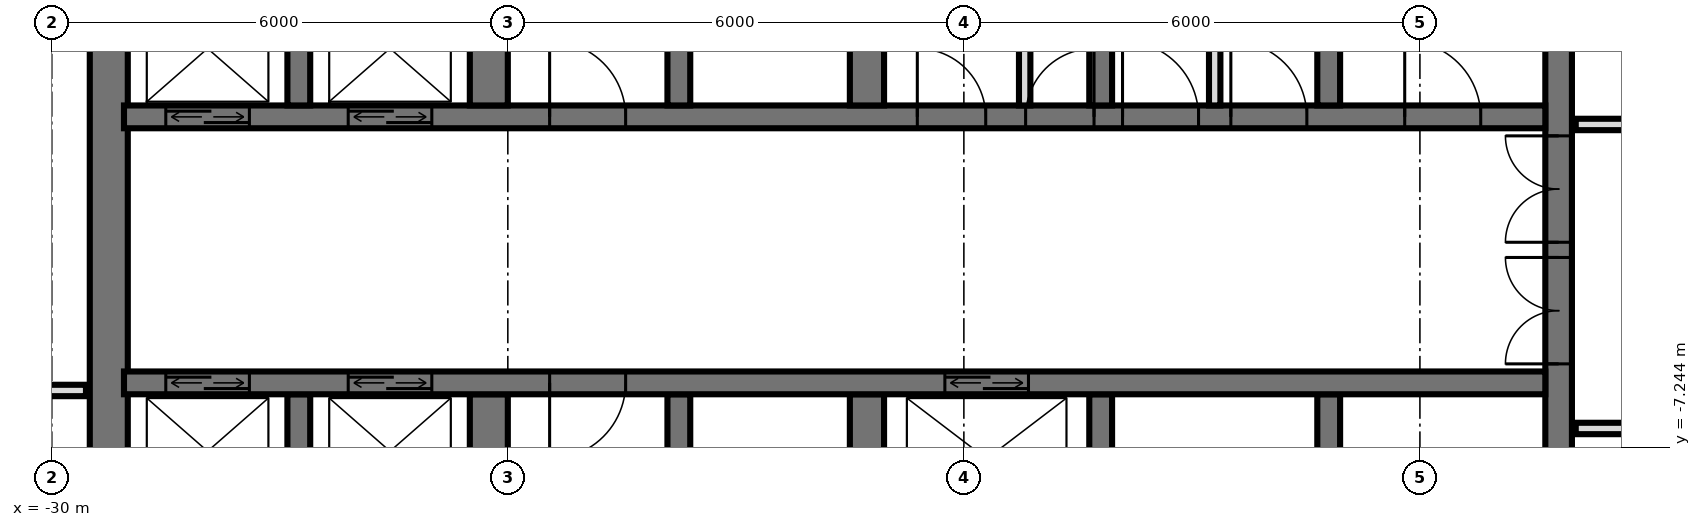
"""IFC4 building model, lengths in metres.
Left out: names, types, materials, properties, quantities, classifications, styles, units other than length and angle.
Written with IfcOpenShell. Run it as: python <this file> out.ifc"""

import sys

from ifc_helpers import new_model, si_unit, direction, frame, frame_2d, origin, place, context, subcontext, project, spatial, rectangle, extrude, element, fill, save


model = new_model("IFC4")
c1 = context("Model", 3, precision=1e-05, world=origin(), true_north=direction((0.0, 1.0)))
c2 = subcontext(c1, "Body", "Model", "MODEL_VIEW")
j1 = project(units=[si_unit("LENGTHUNIT", "METRE"), si_unit("PLANEANGLEUNIT", "RADIAN")], contexts=[c1])
p1 = place(None, origin())
s1 = spatial("IfcSite", under=j1, at=p1, CompositionType="ELEMENT")
p2 = place(p1, origin())
s2 = spatial("IfcBuilding", under=s1, at=p2, CompositionType="ELEMENT")
p3 = place(p2, frame((0.0, 0.0, 74.4)))
s3 = spatial("IfcBuildingStorey", under=s2, at=p3, CompositionType="ELEMENT", Elevation=74.4)
p4 = place(p3, frame((-10.175, -14.55, 0.0), z_axis=(0.0, 0.0, 1.0), x_axis=(0.0, 1.0, 0.0)))
e1 = element("IfcWall", 1, at=p4, inside=s3, PredefinedType="SHEAR", context=c2, shape_type="SweptSolid", body=[
    extrude(rectangle(XDim=14.1, YDim=0.35, at=frame_2d((7.05, 0.0))), origin(), (0.0, 0.0, 1.0), 3.6),
])
p5 = place(p4, frame((8.4, 0.0, 0.0)))
e2 = element("IfcOpeningElement", 2, at=p5, cuts=e1, PredefinedType="OPENING", context=c2, shape_type="SweptSolid", body=[
    extrude(rectangle(XDim=1.4, YDim=2.4, at=frame_2d((0.7, 1.2))), frame((0.0, 0.185, 0.0), z_axis=(0.0, -1.0, 0.0), x_axis=(1.0, 0.0, 0.0)), (0.0, 0.0, 1.0), 0.37),
])
p6 = place(p4, frame((10.0, 0.0, 0.0)))
e3 = element("IfcOpeningElement", 3, at=p6, cuts=e1, PredefinedType="OPENING", context=c2, shape_type="SweptSolid", body=[
    extrude(rectangle(XDim=1.4, YDim=2.4, at=frame_2d((0.7, 1.2))), frame((0.0, 0.185, 0.0), z_axis=(0.0, -1.0, 0.0), x_axis=(1.0, 0.0, 0.0)), (0.0, 0.0, 1.0), 0.37),
])
p7 = place(p4, frame((4.0, 0.0, 0.0)))
e4 = element("IfcOpeningElement", 4, at=p7, cuts=e1, PredefinedType="OPENING", context=c2, shape_type="SweptSolid", body=[
    extrude(rectangle(XDim=1.2, YDim=2.1, at=frame_2d((0.6, 1.05))), frame((0.0, 0.185, 0.0), z_axis=(0.0, -1.0, 0.0), x_axis=(1.0, 0.0, 0.0)), (0.0, 0.0, 1.0), 0.37),
])
p8 = place(p3, frame((-29.25, -14.55, 0.0), z_axis=(0.0, 0.0, 1.0), x_axis=(0.0, 1.0, 0.0)))
e5 = element("IfcWall", 5, at=p8, inside=s3, PredefinedType="SHEAR", context=c2, shape_type="SweptSolid", body=[
    extrude(rectangle(XDim=14.1, YDim=0.5, at=frame_2d((7.05, 0.0))), origin(), (0.0, 0.0, 1.0), 3.6),
])
p9 = place(p3, frame((-29.05, -2.9, 0.0), z_axis=(0.0, 0.0, 1.0), x_axis=(1.0, 0.0, 0.0)))
e6 = element("IfcWall", 6, at=p9, inside=s3, PredefinedType="SHEAR", context=c2, shape_type="SweptSolid", body=[
    extrude(rectangle(XDim=18.7, YDim=0.3, at=frame_2d((9.35, 0.0))), origin(), (0.0, 0.0, 1.0), 3.6),
])
p10 = place(p9, frame((2.95, 0.0, 0.0)))
e7 = element("IfcOpeningElement", 7, at=p10, cuts=e6, PredefinedType="OPENING", context=c2, shape_type="SweptSolid", body=[
    extrude(rectangle(XDim=1.1, YDim=2.1, at=frame_2d((0.55, 1.05))), frame((0.0, 0.16, 0.0), z_axis=(0.0, -1.0, 0.0), x_axis=(1.0, 0.0, 0.0)), (0.0, 0.0, 1.0), 0.32),
])
p11 = place(p9, frame((0.55, 0.0, 0.0)))
e8 = element("IfcOpeningElement", 8, at=p11, cuts=e6, PredefinedType="OPENING", context=c2, shape_type="SweptSolid", body=[
    extrude(rectangle(XDim=1.1, YDim=2.1, at=frame_2d((0.55, 1.05))), frame((0.0, 0.16, 0.0), z_axis=(0.0, -1.0, 0.0), x_axis=(1.0, 0.0, 0.0)), (0.0, 0.0, 1.0), 0.32),
])
p12 = place(p9, frame((11.863, 0.0, 0.0)))
e9 = element("IfcOpeningElement", 9, at=p12, cuts=e6, PredefinedType="OPENING", context=c2, shape_type="SweptSolid", body=[
    extrude(rectangle(XDim=0.9, YDim=2.1, at=frame_2d((0.45, 1.05))), frame((0.0, 0.16, 0.0), z_axis=(0.0, -1.0, 0.0), x_axis=(1.0, 0.0, 0.0)), (0.0, 0.0, 1.0), 0.32),
])
p13 = place(p9, frame((10.438, 0.0, 0.0)))
e10 = element("IfcOpeningElement", 10, at=p13, cuts=e6, PredefinedType="OPENING", context=c2, shape_type="SweptSolid", body=[
    extrude(rectangle(XDim=0.9, YDim=2.1, at=frame_2d((0.45, 1.05))), frame((0.0, 0.16, 0.0), z_axis=(0.0, -1.0, 0.0), x_axis=(1.0, 0.0, 0.0)), (0.0, 0.0, 1.0), 0.32),
])
p14 = place(p9, frame((16.85, 0.0, 0.0)))
e11 = element("IfcOpeningElement", 11, at=p14, cuts=e6, PredefinedType="OPENING", context=c2, shape_type="SweptSolid", body=[
    extrude(rectangle(XDim=1.0, YDim=2.1, at=frame_2d((0.5, 1.05))), frame((0.0, 0.16, 0.0), z_axis=(0.0, -1.0, 0.0), x_axis=(1.0, 0.0, 0.0)), (0.0, 0.0, 1.0), 0.32),
])
p15 = place(p9, frame((14.562, 0.0, 0.0)))
e12 = element("IfcOpeningElement", 12, at=p15, cuts=e6, PredefinedType="OPENING", context=c2, shape_type="SweptSolid", body=[
    extrude(rectangle(XDim=1.0, YDim=2.1, at=frame_2d((0.5, 1.05))), frame((0.0, 0.16, 0.0), z_axis=(0.0, -1.0, 0.0), x_axis=(1.0, 0.0, 0.0)), (0.0, 0.0, 1.0), 0.32),
])
p16 = place(p9, frame((13.137, 0.0, 0.0)))
e13 = element("IfcOpeningElement", 13, at=p16, cuts=e6, PredefinedType="OPENING", context=c2, shape_type="SweptSolid", body=[
    extrude(rectangle(XDim=1.0, YDim=2.1, at=frame_2d((0.5, 1.05))), frame((0.0, 0.16, 0.0), z_axis=(0.0, -1.0, 0.0), x_axis=(1.0, 0.0, 0.0)), (0.0, 0.0, 1.0), 0.32),
])
p17 = place(p9, frame((5.6, 0.0, 0.0)))
e14 = element("IfcOpeningElement", 14, at=p17, cuts=e6, PredefinedType="OPENING", context=c2, shape_type="SweptSolid", body=[
    extrude(rectangle(XDim=1.0, YDim=2.1, at=frame_2d((0.5, 1.05))), frame((0.0, 0.16, 0.0), z_axis=(0.0, -1.0, 0.0), x_axis=(1.0, 0.0, 0.0)), (0.0, 0.0, 1.0), 0.32),
])
p18 = place(p3, frame((-29.05, -6.4, 0.0), z_axis=(0.0, 0.0, 1.0), x_axis=(1.0, 0.0, 0.0)))
e15 = element("IfcWall", 15, at=p18, inside=s3, PredefinedType="SHEAR", context=c2, shape_type="SweptSolid", body=[
    extrude(rectangle(XDim=18.7, YDim=0.3, at=frame_2d((9.35, 0.0))), origin(), (0.0, 0.0, 1.0), 3.6),
])
p19 = place(p18, frame((2.95, 0.0, 0.0)))
e16 = element("IfcOpeningElement", 16, at=p19, cuts=e15, PredefinedType="OPENING", context=c2, shape_type="SweptSolid", body=[
    extrude(rectangle(XDim=1.1, YDim=2.1, at=frame_2d((0.55, 1.05))), frame((0.0, 0.16, 0.0), z_axis=(0.0, -1.0, 0.0), x_axis=(1.0, 0.0, 0.0)), (0.0, 0.0, 1.0), 0.32),
])
p20 = place(p18, frame((0.55, 0.0, 0.0)))
e17 = element("IfcOpeningElement", 17, at=p20, cuts=e15, PredefinedType="OPENING", context=c2, shape_type="SweptSolid", body=[
    extrude(rectangle(XDim=1.1, YDim=2.1, at=frame_2d((0.55, 1.05))), frame((0.0, 0.16, 0.0), z_axis=(0.0, -1.0, 0.0), x_axis=(1.0, 0.0, 0.0)), (0.0, 0.0, 1.0), 0.32),
])
p21 = place(p18, frame((10.8, 0.0, 0.0)))
e18 = element("IfcOpeningElement", 18, at=p21, cuts=e15, PredefinedType="OPENING", context=c2, shape_type="SweptSolid", body=[
    extrude(rectangle(XDim=1.1, YDim=2.1, at=frame_2d((0.55, 1.05))), frame((0.0, 0.16, 0.0), z_axis=(0.0, -1.0, 0.0), x_axis=(1.0, 0.0, 0.0)), (0.0, 0.0, 1.0), 0.32),
])
p22 = place(p18, frame((5.6, 0.0, 0.0)))
e19 = element("IfcOpeningElement", 19, at=p22, cuts=e15, PredefinedType="OPENING", context=c2, shape_type="SweptSolid", body=[
    extrude(rectangle(XDim=1.0, YDim=2.1, at=frame_2d((0.5, 1.05))), frame((0.0, 0.16, 0.0), z_axis=(0.0, -1.0, 0.0), x_axis=(1.0, 0.0, 0.0)), (0.0, 0.0, 1.0), 0.32),
])
for number, where, z_axis, x_axis in (
    (20, (-13.2, -2.75, 0.0), (0.0, 0.0, 1.0), (0.0, 1.0, 0.0)),
    (21, (-13.2, -8.85, 0.0), (0.0, 0.0, 1.0), (0.0, 1.0, 0.0)),
    (22, (-16.2, -2.75, 0.0), (0.0, 0.0, 1.0), (0.0, 1.0, 0.0)),
    (23, (-16.2, -8.85, 0.0), (0.0, 0.0, 1.0), (0.0, 1.0, 0.0)),
):
    element("IfcWall", number, at=place(p3, frame(where, z_axis=z_axis, x_axis=x_axis)), inside=s3, PredefinedType="SHEAR", context=c2, shape_type="SweptSolid", body=[
        extrude(rectangle(XDim=2.3, YDim=0.3, at=frame_2d((1.15, 0.0))), origin(), (0.0, 0.0, 1.0), 3.6),
    ])
for number, where, z_axis, x_axis in (
    (24, (-19.275, -2.75, 0.0), (0.0, 0.0, 1.0), (0.0, 1.0, 0.0)),
    (25, (-19.275, -8.85, 0.0), (0.0, 0.0, 1.0), (0.0, 1.0, 0.0)),
):
    element("IfcWall", number, at=place(p3, frame(where, z_axis=z_axis, x_axis=x_axis)), inside=s3, PredefinedType="SHEAR", context=c2, shape_type="SweptSolid", body=[
        extrude(rectangle(XDim=2.3, YDim=0.45, at=frame_2d((1.15, 0.0))), origin(), (0.0, 0.0, 1.0), 3.6),
    ])
for number, where, z_axis, x_axis in (
    (26, (-21.75, -2.75, 0.0), (0.0, 0.0, 1.0), (0.0, 1.0, 0.0)),
    (27, (-21.75, -8.85, 0.0), (0.0, 0.0, 1.0), (0.0, 1.0, 0.0)),
):
    element("IfcWall", number, at=place(p3, frame(where, z_axis=z_axis, x_axis=x_axis)), inside=s3, PredefinedType="SHEAR", context=c2, shape_type="SweptSolid", body=[
        extrude(rectangle(XDim=2.3, YDim=0.3, at=frame_2d((1.15, 0.0))), origin(), (0.0, 0.0, 1.0), 3.6),
    ])
for number, where, z_axis, x_axis in (
    (28, (-24.25, -2.75, 0.0), (0.0, 0.0, 1.0), (0.0, 1.0, 0.0)),
    (29, (-24.25, -8.85, 0.0), (0.0, 0.0, 1.0), (0.0, 1.0, 0.0)),
):
    element("IfcWall", number, at=place(p3, frame(where, z_axis=z_axis, x_axis=x_axis)), inside=s3, PredefinedType="SHEAR", context=c2, shape_type="SweptSolid", body=[
        extrude(rectangle(XDim=2.3, YDim=0.5, at=frame_2d((1.15, 0.0))), origin(), (0.0, 0.0, 1.0), 3.6),
    ])
for number, where, z_axis, x_axis in (
    (30, (-26.75, -2.75, 0.0), (0.0, 0.0, 1.0), (0.0, 1.0, 0.0)),
    (31, (-26.75, -8.85, 0.0), (0.0, 0.0, 1.0), (0.0, 1.0, 0.0)),
):
    element("IfcWall", number, at=place(p3, frame(where, z_axis=z_axis, x_axis=x_axis)), inside=s3, PredefinedType="SHEAR", context=c2, shape_type="SweptSolid", body=[
        extrude(rectangle(XDim=2.3, YDim=0.3, at=frame_2d((1.15, 0.0))), origin(), (0.0, 0.0, 1.0), 3.6),
    ])
for number, where, z_axis, x_axis in (
    (32, (-17.2, -2.75, 0.0), (0.0, 0.0, 1.0), (0.0, 1.0, 0.0)),
    (33, (-14.7, -2.75, 0.0), (0.0, 0.0, 1.0), (0.0, 1.0, 0.0)),
):
    element("IfcWall", number, at=place(p3, frame(where, z_axis=z_axis, x_axis=x_axis)), inside=s3, PredefinedType="PARTITIONING", context=c2, shape_type="SweptSolid", body=[
        extrude(rectangle(XDim=2.3, YDim=0.15, at=frame_2d((1.15, 0.0))), origin(), (0.0, 0.0, 1.0), 3.3),
    ])
p23 = place(p3, frame((-9.95, -7.0, 0.0), z_axis=(0.0, 0.0, 1.0), x_axis=(1.0, 0.0, 0.0)))
e34 = element("IfcWall", 34, at=p23, inside=s3, PredefinedType="PARTITIONING", context=c2, shape_type="SweptSolid", body=[
    extrude(rectangle(XDim=19.9, YDim=0.15, at=frame_2d((9.95, 0.0))), origin(), (0.0, 0.0, 1.0), 3.32),
])
p24 = place(p23, frame((9.45, 0.0, 0.0)))
e35 = element("IfcOpeningElement", 35, at=p24, cuts=e34, PredefinedType="OPENING", context=c2, shape_type="SweptSolid", body=[
    extrude(rectangle(XDim=1.0, YDim=2.1, at=frame_2d((0.5, 1.05))), frame((0.0, 0.085, 0.0), z_axis=(0.0, -1.0, 0.0), x_axis=(1.0, 0.0, 0.0)), (0.0, 0.0, 1.0), 0.17),
])
p25 = place(p23, frame((3.45, 0.0, 0.0)))
e36 = element("IfcOpeningElement", 36, at=p25, cuts=e34, PredefinedType="OPENING", context=c2, shape_type="SweptSolid", body=[
    extrude(rectangle(XDim=1.0, YDim=2.1, at=frame_2d((0.5, 1.05))), frame((0.0, 0.085, 0.0), z_axis=(0.0, -1.0, 0.0), x_axis=(1.0, 0.0, 0.0)), (0.0, 0.0, 1.0), 0.17),
])
p26 = place(p3, frame((-33.12, -6.5, 0.0), z_axis=(0.0, 0.0, 1.0), x_axis=(1.0, 0.0, 0.0)))
e37 = element("IfcWall", 37, at=p26, inside=s3, PredefinedType="PARTITIONING", context=c2, shape_type="SweptSolid", body=[
    extrude(rectangle(XDim=3.57, YDim=0.15, at=frame_2d((1.785, 0.0))), origin(), (0.0, 0.0, 1.0), 3.32),
])
p27 = place(p26, frame((1.27, 0.0, 0.0)))
e38 = element("IfcOpeningElement", 38, at=p27, cuts=e37, PredefinedType="OPENING", context=c2, shape_type="SweptSolid", body=[
    extrude(rectangle(XDim=0.9, YDim=2.1, at=frame_2d((0.45, 1.05))), frame((0.0, 0.085, 0.0), z_axis=(0.0, -1.0, 0.0), x_axis=(1.0, 0.0, 0.0)), (0.0, 0.0, 1.0), 0.17),
])
p28 = place(p3, frame((-9.95, -3.0, 0.0), z_axis=(0.0, 0.0, 1.0), x_axis=(1.0, 0.0, 0.0)))
e39 = element("IfcWall", 39, at=p28, inside=s3, PredefinedType="PARTITIONING", context=c2, shape_type="SweptSolid", body=[
    extrude(rectangle(XDim=19.9, YDim=0.15, at=frame_2d((9.95, 0.0))), origin(), (0.0, 0.0, 1.0), 3.32),
])
p29 = place(p28, frame((1.45, 0.0, 0.0)))
e40 = element("IfcOpeningElement", 40, at=p29, cuts=e39, PredefinedType="OPENING", context=c2, shape_type="SweptSolid", body=[
    extrude(rectangle(XDim=1.0, YDim=2.1, at=frame_2d((0.5, 1.05))), frame((0.0, 0.085, 0.0), z_axis=(0.0, -1.0, 0.0), x_axis=(1.0, 0.0, 0.0)), (0.0, 0.0, 1.0), 0.17),
])
p30 = place(p28, frame((4.95, 0.0, 0.0)))
e41 = element("IfcOpeningElement", 41, at=p30, cuts=e39, PredefinedType="OPENING", context=c2, shape_type="SweptSolid", body=[
    extrude(rectangle(XDim=1.0, YDim=2.1, at=frame_2d((0.5, 1.05))), frame((0.0, 0.085, 0.0), z_axis=(0.0, -1.0, 0.0), x_axis=(1.0, 0.0, 0.0)), (0.0, 0.0, 1.0), 0.17),
])
p31 = place(p28, frame((7.7, 0.0, 0.0)))
e42 = element("IfcOpeningElement", 42, at=p31, cuts=e39, PredefinedType="OPENING", context=c2, shape_type="SweptSolid", body=[
    extrude(rectangle(XDim=1.0, YDim=2.1, at=frame_2d((0.5, 1.05))), frame((0.0, 0.085, 0.0), z_axis=(0.0, -1.0, 0.0), x_axis=(1.0, 0.0, 0.0)), (0.0, 0.0, 1.0), 0.17),
])
p32 = place(p28, frame((14.2, 0.0, 0.0)))
e43 = element("IfcOpeningElement", 43, at=p32, cuts=e39, PredefinedType="OPENING", context=c2, shape_type="SweptSolid", body=[
    extrude(rectangle(XDim=1.0, YDim=2.1, at=frame_2d((0.5, 1.05))), frame((0.0, 0.085, 0.0), z_axis=(0.0, -1.0, 0.0), x_axis=(1.0, 0.0, 0.0)), (0.0, 0.0, 1.0), 0.17),
])
p33 = place(p10, origin())
e44 = element("IfcDoor", 44, at=p33, inside=s3, OperationType="DOUBLE_DOOR_SLIDING", PredefinedType="USERDEFINED", context=c2, shape_type="SweptSolid", body=[
    extrude(rectangle(XDim=1.1, YDim=2.1, at=frame_2d((0.55, 1.05))), frame((0.0, 0.025, 0.0), z_axis=(0.0, -1.0, 0.0), x_axis=(1.0, 0.0, 0.0)), (0.0, 0.0, 1.0), 0.05),
])
fill(e7, e44)
p34 = place(p11, origin())
e45 = element("IfcDoor", 45, at=p34, inside=s3, OperationType="DOUBLE_DOOR_SLIDING", PredefinedType="USERDEFINED", context=c2, shape_type="SweptSolid", body=[
    extrude(rectangle(XDim=1.1, YDim=2.1, at=frame_2d((0.55, 1.05))), frame((0.0, 0.025, 0.0), z_axis=(0.0, -1.0, 0.0), x_axis=(1.0, 0.0, 0.0)), (0.0, 0.0, 1.0), 0.05),
])
fill(e8, e45)
p35 = place(p19, origin())
e46 = element("IfcDoor", 46, at=p35, inside=s3, OperationType="DOUBLE_DOOR_SLIDING", PredefinedType="USERDEFINED", context=c2, shape_type="SweptSolid", body=[
    extrude(rectangle(XDim=1.1, YDim=2.1, at=frame_2d((0.55, 1.05))), frame((0.0, 0.025, 0.0), z_axis=(0.0, -1.0, 0.0), x_axis=(1.0, 0.0, 0.0)), (0.0, 0.0, 1.0), 0.05),
])
fill(e16, e46)
p36 = place(p20, origin())
e47 = element("IfcDoor", 47, at=p36, inside=s3, OperationType="DOUBLE_DOOR_SLIDING", PredefinedType="USERDEFINED", context=c2, shape_type="SweptSolid", body=[
    extrude(rectangle(XDim=1.1, YDim=2.1, at=frame_2d((0.55, 1.05))), frame((0.0, 0.025, 0.0), z_axis=(0.0, -1.0, 0.0), x_axis=(1.0, 0.0, 0.0)), (0.0, 0.0, 1.0), 0.05),
])
fill(e17, e47)
p37 = place(p21, origin())
e48 = element("IfcDoor", 48, at=p37, inside=s3, OperationType="DOUBLE_DOOR_SLIDING", PredefinedType="USERDEFINED", context=c2, shape_type="SweptSolid", body=[
    extrude(rectangle(XDim=1.1, YDim=2.1, at=frame_2d((0.55, 1.05))), frame((0.0, 0.025, 0.0), z_axis=(0.0, -1.0, 0.0), x_axis=(1.0, 0.0, 0.0)), (0.0, 0.0, 1.0), 0.05),
])
fill(e18, e48)
p38 = place(p5, origin())
e49 = element("IfcDoor", 49, at=p38, inside=s3, OperationType="DOUBLE_DOOR_SINGLE_SWING", PredefinedType="DOOR", context=c2, shape_type="SweptSolid", body=[
    extrude(rectangle(XDim=1.4, YDim=2.4, at=frame_2d((0.7, 1.2))), frame((0.0, 0.025, 0.0), z_axis=(0.0, -1.0, 0.0), x_axis=(1.0, 0.0, 0.0)), (0.0, 0.0, 1.0), 0.05),
])
fill(e2, e49)
p39 = place(p6, origin())
e50 = element("IfcDoor", 50, at=p39, inside=s3, OperationType="DOUBLE_DOOR_SINGLE_SWING", PredefinedType="DOOR", context=c2, shape_type="SweptSolid", body=[
    extrude(rectangle(XDim=1.4, YDim=2.4, at=frame_2d((0.7, 1.2))), frame((0.0, 0.025, 0.0), z_axis=(0.0, -1.0, 0.0), x_axis=(1.0, 0.0, 0.0)), (0.0, 0.0, 1.0), 0.05),
])
fill(e3, e50)
p40 = place(p12, origin())
e51 = element("IfcDoor", 51, at=p40, inside=s3, OperationType="SINGLE_SWING_LEFT", PredefinedType="DOOR", context=c2, shape_type="SweptSolid", body=[
    extrude(rectangle(XDim=0.9, YDim=2.1, at=frame_2d((0.45, 1.05))), frame((0.0, 0.025, 0.0), z_axis=(0.0, -1.0, 0.0), x_axis=(1.0, 0.0, 0.0)), (0.0, 0.0, 1.0), 0.05),
])
fill(e9, e51)
p41 = place(p13, origin())
e52 = element("IfcDoor", 52, at=p41, inside=s3, OperationType="SINGLE_SWING_RIGHT", PredefinedType="DOOR", context=c2, shape_type="SweptSolid", body=[
    extrude(rectangle(XDim=0.9, YDim=2.1, at=frame_2d((0.45, 1.05))), frame((0.0, 0.025, 0.0), z_axis=(0.0, -1.0, 0.0), x_axis=(1.0, 0.0, 0.0)), (0.0, 0.0, 1.0), 0.05),
])
fill(e10, e52)
p42 = place(p14, origin())
e53 = element("IfcDoor", 53, at=p42, inside=s3, OperationType="SINGLE_SWING_RIGHT", PredefinedType="DOOR", context=c2, shape_type="SweptSolid", body=[
    extrude(rectangle(XDim=1.0, YDim=2.1, at=frame_2d((0.5, 1.05))), frame((0.0, 0.025, 0.0), z_axis=(0.0, -1.0, 0.0), x_axis=(1.0, 0.0, 0.0)), (0.0, 0.0, 1.0), 0.05),
])
fill(e11, e53)
p43 = place(p15, origin())
e54 = element("IfcDoor", 54, at=p43, inside=s3, OperationType="SINGLE_SWING_RIGHT", PredefinedType="DOOR", context=c2, shape_type="SweptSolid", body=[
    extrude(rectangle(XDim=1.0, YDim=2.1, at=frame_2d((0.5, 1.05))), frame((0.0, 0.025, 0.0), z_axis=(0.0, -1.0, 0.0), x_axis=(1.0, 0.0, 0.0)), (0.0, 0.0, 1.0), 0.05),
])
fill(e12, e54)
p44 = place(p16, origin())
e55 = element("IfcDoor", 55, at=p44, inside=s3, OperationType="SINGLE_SWING_RIGHT", PredefinedType="DOOR", context=c2, shape_type="SweptSolid", body=[
    extrude(rectangle(XDim=1.0, YDim=2.1, at=frame_2d((0.5, 1.05))), frame((0.0, 0.025, 0.0), z_axis=(0.0, -1.0, 0.0), x_axis=(1.0, 0.0, 0.0)), (0.0, 0.0, 1.0), 0.05),
])
fill(e13, e55)
p45 = place(p17, origin())
e56 = element("IfcDoor", 56, at=p45, inside=s3, OperationType="SINGLE_SWING_RIGHT", PredefinedType="DOOR", context=c2, shape_type="SweptSolid", body=[
    extrude(rectangle(XDim=1.0, YDim=2.1, at=frame_2d((0.5, 1.05))), frame((0.0, 0.025, 0.0), z_axis=(0.0, -1.0, 0.0), x_axis=(1.0, 0.0, 0.0)), (0.0, 0.0, 1.0), 0.05),
])
fill(e14, e56)
p46 = place(p22, frame((0.5, 0.0, 0.0), z_axis=(0.0, 0.0, 1.0), x_axis=(-1.0, 0.0, 0.0)))
e57 = element("IfcDoor", 57, at=p46, inside=s3, OperationType="SINGLE_SWING_LEFT", PredefinedType="DOOR", context=c2, shape_type="SweptSolid", body=[
    extrude(rectangle(XDim=1.0, YDim=2.1, at=frame_2d((0.0, 1.05))), frame((0.0, -0.025, 0.0), z_axis=(0.0, 1.0, 0.0), x_axis=(-1.0, 0.0, 0.0)), (0.0, 0.0, 1.0), 0.05),
])
fill(e19, e57)
save(model, sys.argv[1])
